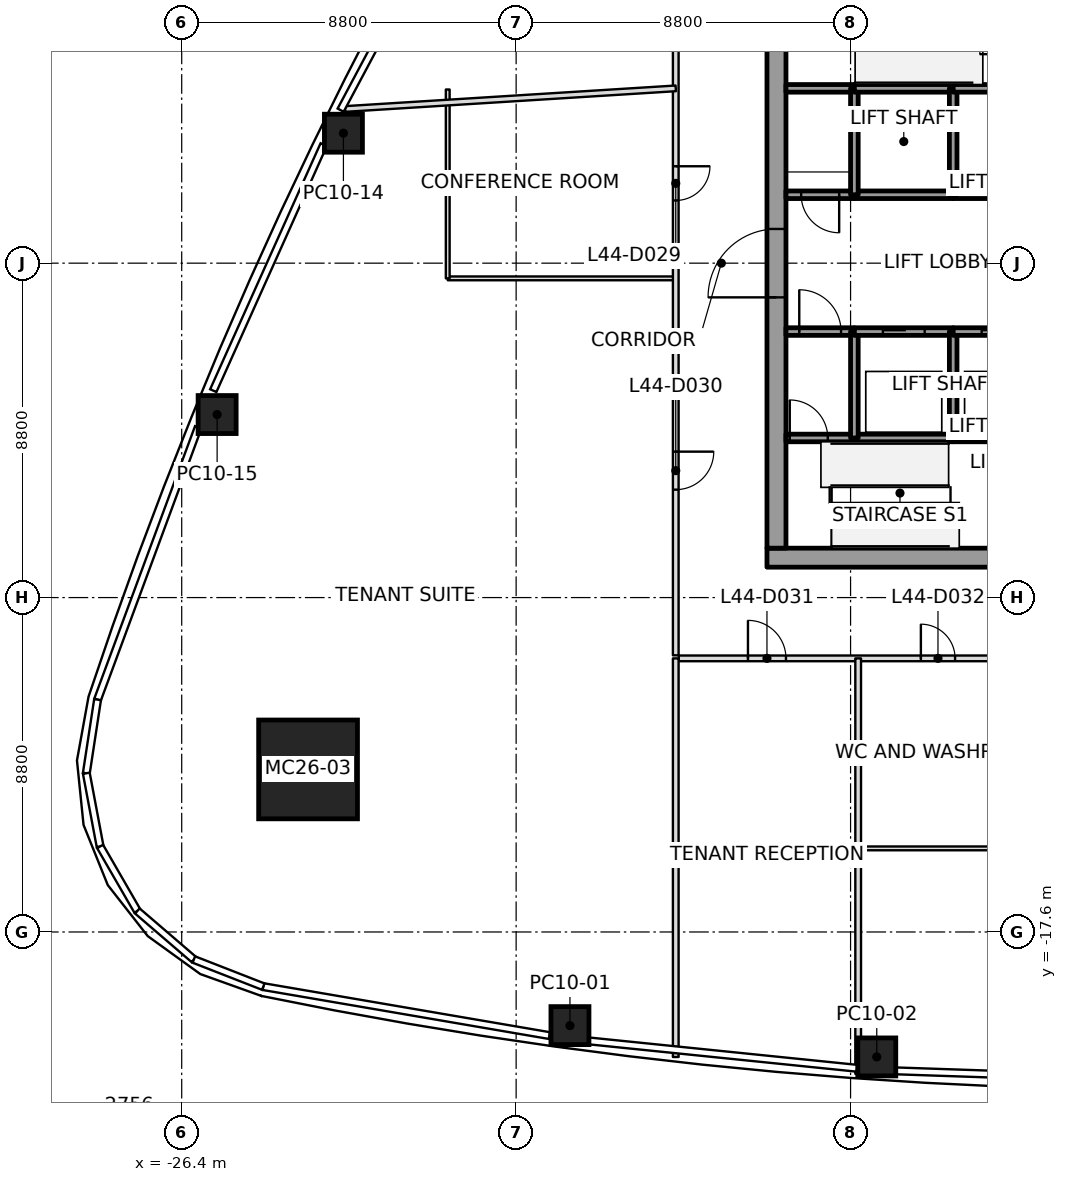
"""IFC4 building model, lengths in metres.
Left out: names, types, materials, properties, quantities, classifications, styles, units other than length and angle.
Written with IfcOpenShell. Run it as: python <this file> out.ifc"""

import sys

from ifc_helpers import new_model, si_unit, direction, frame, frame_2d, origin, origin_2d, place, context, subcontext, project, spatial, rectangle, extrude, element, fill, save


model = new_model("IFC4")
c1 = context("Model", 3, precision=1e-05, world=origin(), true_north=direction((0.0, 1.0)))
c2 = subcontext(c1, "Body", "Model", "MODEL_VIEW")
j1 = project(units=[si_unit("LENGTHUNIT", "METRE"), si_unit("PLANEANGLEUNIT", "RADIAN")], contexts=[c1])
p1 = place(None, origin())
s1 = spatial("IfcSite", under=j1, at=p1, CompositionType="ELEMENT")
p2 = place(p1, origin())
s2 = spatial("IfcBuilding", under=s1, at=p2, CompositionType="ELEMENT")
p3 = place(p2, frame((0.0, 0.0, 197.8)))
s3 = spatial("IfcBuildingStorey", under=s2, at=p3, CompositionType="ELEMENT", Elevation=197.8)
p4 = place(p3, frame((-23.075, -13.322, 0.0), z_axis=(0.028000517465, 0.01610487279, 0.999478165892), x_axis=(0.999607908643, -0.000451121653, -0.027996883176)))
e1 = element("IfcColumn", 1, at=p4, inside=s3, PredefinedType="COLUMN", context=c2, shape_type="SweptSolid", body=[
    extrude(rectangle(XDim=2.6, YDim=2.6, at=origin_2d()), origin(), (0.0, 0.0, 1.0), 4.002),
])
p5 = place(p3, frame((-16.184, -20.064, 0.0), z_axis=(0.017635456472, 0.010434820265, 0.999790030557), x_axis=(-0.99066656356, 0.135357964794, 0.016061793511)))
e2 = element("IfcColumn", 2, at=p5, inside=s3, PredefinedType="COLUMN", context=c2, shape_type="SweptSolid", body=[
    extrude(rectangle(XDim=1.0, YDim=1.0, at=origin_2d()), origin(), (0.0, 0.0, 1.0), 4.001),
])
for number, where, z_axis, x_axis in (
    (3, (-8.111, -20.888, 0.0), (0.009, 0.011, 1.0), (-0.998, 0.068, 0.008)),
    (4, (-22.145, 3.42, 0.0), (0.014, 0.002, 1.0), (0.44, 0.898, -0.008)),
):
    element("IfcColumn", number, at=place(p3, frame(where, z_axis=z_axis, x_axis=x_axis)), inside=s3, PredefinedType="COLUMN", context=c2, shape_type="SweptSolid", body=[
        extrude(rectangle(XDim=1.0, YDim=1.0, at=origin_2d()), origin(), (0.0, 0.0, 1.0), 4.0),
    ])
p6 = place(p3, frame((-25.468, -3.984, 0.0), z_axis=(0.017879535448, 0.010068680372, 0.999789449778), x_axis=(0.378277966466, 0.925552280287, -0.016085911281)))
e5 = element("IfcColumn", 5, at=p6, inside=s3, PredefinedType="COLUMN", context=c2, shape_type="SweptSolid", body=[
    extrude(rectangle(XDim=1.0, YDim=1.0, at=origin_2d()), origin(), (0.0, 0.0, 1.0), 4.001),
])
p7 = place(p3, frame((-11.0, -7.75, 0.0), z_axis=(0.0, 0.0, 1.0), x_axis=(1.0, 0.0, 0.0)))
e6 = element("IfcWall", 6, at=p7, inside=s3, PredefinedType="SHEAR", context=c2, shape_type="SweptSolid", body=[
    extrude(rectangle(XDim=22.0, YDim=0.5, at=frame_2d((11.0, 0.0))), origin(), (0.0, 0.0, 1.0), 4.0),
])
p8 = place(p7, frame((10.45, 0.0, 0.0)))
e7 = element("IfcOpeningElement", 7, at=p8, cuts=e6, PredefinedType="OPENING", context=c2, shape_type="SweptSolid", body=[
    extrude(rectangle(XDim=1.1, YDim=2.1, at=frame_2d((0.55, 1.05))), frame((0.0, 0.25, 0.0), z_axis=(0.0, -1.0, 0.0), x_axis=(1.0, 0.0, 0.0)), (0.0, 0.0, 1.0), 0.5),
])
p9 = place(p3, frame((-10.75, -7.5, 0.0), z_axis=(0.0, 0.0, 1.0), x_axis=(0.0, 1.0, 0.0)))
e8 = element("IfcWall", 8, at=p9, inside=s3, PredefinedType="SHEAR", context=c2, shape_type="SweptSolid", body=[
    extrude(rectangle(XDim=15.0, YDim=0.5, at=frame_2d((7.5, 0.0))), origin(), (0.0, 0.0, 1.0), 4.0),
])
p10 = place(p9, frame((6.6, 0.0, 0.0)))
e9 = element("IfcOpeningElement", 9, at=p10, cuts=e8, PredefinedType="OPENING", context=c2, shape_type="SweptSolid", body=[
    extrude(rectangle(XDim=1.8, YDim=2.1, at=frame_2d((0.9, 1.05))), frame((0.0, 0.25, 0.0), z_axis=(0.0, -1.0, 0.0), x_axis=(1.0, 0.0, 0.0)), (0.0, 0.0, 1.0), 0.5),
])
p11 = place(p3, frame((-10.5, -4.6, 0.0), z_axis=(0.0, 0.0, 1.0), x_axis=(1.0, 0.0, 0.0)))
e10 = element("IfcWall", 10, at=p11, inside=s3, PredefinedType="SOLIDWALL", context=c2, shape_type="SweptSolid", body=[
    extrude(rectangle(XDim=1.8, YDim=0.2, at=frame_2d((0.9, 0.0))), origin(), (0.0, 0.0, 1.0), 3.85),
])
p12 = place(p11, frame((0.1, 0.0, 0.0)))
e11 = element("IfcOpeningElement", 11, at=p12, cuts=e10, PredefinedType="OPENING", context=c2, shape_type="SweptSolid", body=[
    extrude(rectangle(XDim=1.0, YDim=2.1, at=frame_2d((0.5, 1.05))), frame((0.0, 0.1, 0.0), z_axis=(0.0, -1.0, 0.0), x_axis=(1.0, 0.0, 0.0)), (0.0, 0.0, 1.0), 0.2),
])
p13 = place(p3, frame((-10.5, -1.8, 0.0), z_axis=(0.0, 0.0, 1.0), x_axis=(1.0, 0.0, 0.0)))
e12 = element("IfcWall", 12, at=p13, inside=s3, PredefinedType="SOLIDWALL", context=c2, shape_type="SweptSolid", body=[
    extrude(rectangle(XDim=1.8, YDim=0.2, at=frame_2d((0.9, 0.0))), origin(), (0.0, 0.0, 1.0), 3.85),
])
p14 = place(p13, frame((0.35, 0.0, 0.0)))
e13 = element("IfcOpeningElement", 13, at=p14, cuts=e12, PredefinedType="OPENING", context=c2, shape_type="SweptSolid", body=[
    extrude(rectangle(XDim=1.1, YDim=2.1, at=frame_2d((0.55, 1.05))), frame((0.0, 0.1, 0.0), z_axis=(0.0, -1.0, 0.0), x_axis=(1.0, 0.0, 0.0)), (0.0, 0.0, 1.0), 0.2),
])
p15 = place(p3, frame((-8.7, 1.8, 0.0), z_axis=(0.0, 0.0, 1.0), x_axis=(-1.0, 0.0, 0.0)))
e14 = element("IfcWall", 14, at=p15, inside=s3, PredefinedType="SOLIDWALL", context=c2, shape_type="SweptSolid", body=[
    extrude(rectangle(XDim=1.8, YDim=0.2, at=frame_2d((0.9, 0.0))), origin(), (0.0, 0.0, 1.0), 3.85),
])
p16 = place(p15, frame((0.4, 0.0, 0.0)))
e15 = element("IfcOpeningElement", 15, at=p16, cuts=e14, PredefinedType="OPENING", context=c2, shape_type="SweptSolid", body=[
    extrude(rectangle(XDim=1.0, YDim=2.1, at=frame_2d((0.5, 1.05))), frame((0.0, 0.1, 0.0), z_axis=(0.0, -1.0, 0.0), x_axis=(1.0, 0.0, 0.0)), (0.0, 0.0, 1.0), 0.2),
])
p17 = place(p3, frame((-8.7, 4.6, 0.0), z_axis=(0.0, 0.0, 1.0), x_axis=(-1.0, 0.0, 0.0)))
e16 = element("IfcWall", 16, at=p17, inside=s3, PredefinedType="SOLIDWALL", context=c2, shape_type="SweptSolid", body=[
    extrude(rectangle(XDim=1.8, YDim=0.2, at=frame_2d((0.9, 0.0))), origin(), (0.0, 0.0, 1.0), 3.85),
])
p18 = place(p3, frame((-8.7, -4.6, 0.0), z_axis=(0.0, 0.0, 1.0), x_axis=(1.0, 0.0, 0.0)))
e17 = element("IfcWall", 17, at=p18, inside=s3, PredefinedType="SOLIDWALL", context=c2, shape_type="SweptSolid", body=[
    extrude(rectangle(XDim=2.6, YDim=0.2, at=frame_2d((1.3, 0.0))), origin(), (0.0, 0.0, 1.0), 3.85),
])
p19 = place(p3, frame((-8.7, -4.6, 0.0), z_axis=(0.0, 0.0, 1.0), x_axis=(0.0, 1.0, 0.0)))
e18 = element("IfcWall", 18, at=p19, inside=s3, PredefinedType="SOLIDWALL", context=c2, shape_type="SweptSolid", body=[
    extrude(rectangle(XDim=2.8, YDim=0.2, at=frame_2d((1.4, 0.0))), origin(), (0.0, 0.0, 1.0), 3.85),
])
p20 = place(p3, frame((-8.7, -1.8, 0.0), z_axis=(0.0, 0.0, 1.0), x_axis=(1.0, 0.0, 0.0)))
e19 = element("IfcWall", 19, at=p20, inside=s3, PredefinedType="SOLIDWALL", context=c2, shape_type="SweptSolid", body=[
    extrude(rectangle(XDim=2.6, YDim=0.2, at=frame_2d((1.3, 0.0))), origin(), (0.0, 0.0, 1.0), 3.85),
])
p21 = place(p20, frame((0.75, 0.0, 0.0)))
e20 = element("IfcOpeningElement", 20, at=p21, cuts=e19, PredefinedType="OPENING", context=c2, shape_type="SweptSolid", body=[
    extrude(rectangle(XDim=1.1, YDim=2.1, at=frame_2d((0.55, 1.05))), frame((0.0, 0.1, 0.0), z_axis=(0.0, -1.0, 0.0), x_axis=(1.0, 0.0, 0.0)), (0.0, 0.0, 1.0), 0.2),
])
p22 = place(p3, frame((-6.1, 1.8, 0.0), z_axis=(0.0, 0.0, 1.0), x_axis=(-1.0, 0.0, 0.0)))
e21 = element("IfcWall", 21, at=p22, inside=s3, PredefinedType="SOLIDWALL", context=c2, shape_type="SweptSolid", body=[
    extrude(rectangle(XDim=2.6, YDim=0.2, at=frame_2d((1.3, 0.0))), origin(), (0.0, 0.0, 1.0), 3.85),
])
p23 = place(p3, frame((-8.7, 1.8, 0.0), z_axis=(0.0, 0.0, 1.0), x_axis=(0.0, 1.0, 0.0)))
e22 = element("IfcWall", 22, at=p23, inside=s3, PredefinedType="SOLIDWALL", context=c2, shape_type="SweptSolid", body=[
    extrude(rectangle(XDim=2.8, YDim=0.2, at=frame_2d((1.4, 0.0))), origin(), (0.0, 0.0, 1.0), 3.85),
])
p24 = place(p3, frame((-6.1, 4.6, 0.0), z_axis=(0.0, 0.0, 1.0), x_axis=(-1.0, 0.0, 0.0)))
e23 = element("IfcWall", 23, at=p24, inside=s3, PredefinedType="SOLIDWALL", context=c2, shape_type="SweptSolid", body=[
    extrude(rectangle(XDim=2.6, YDim=0.2, at=frame_2d((1.3, 0.0))), origin(), (0.0, 0.0, 1.0), 3.85),
])
p25 = place(p3, frame((-6.1, -4.6, 0.0), z_axis=(0.0, 0.0, 1.0), x_axis=(1.0, 0.0, 0.0)))
e24 = element("IfcWall", 24, at=p25, inside=s3, PredefinedType="SOLIDWALL", context=c2, shape_type="SweptSolid", body=[
    extrude(rectangle(XDim=1.6, YDim=0.2, at=frame_2d((0.8, 0.0))), origin(), (0.0, 0.0, 1.0), 3.85),
])
p26 = place(p3, frame((-6.1, -4.6, 0.0), z_axis=(0.0, 0.0, 1.0), x_axis=(0.0, 1.0, 0.0)))
e25 = element("IfcWall", 25, at=p26, inside=s3, PredefinedType="SOLIDWALL", context=c2, shape_type="SweptSolid", body=[
    extrude(rectangle(XDim=2.8, YDim=0.2, at=frame_2d((1.4, 0.0))), origin(), (0.0, 0.0, 1.0), 3.85),
])
p27 = place(p3, frame((-6.1, -1.8, 0.0), z_axis=(0.0, 0.0, 1.0), x_axis=(1.0, 0.0, 0.0)))
e26 = element("IfcWall", 26, at=p27, inside=s3, PredefinedType="SOLIDWALL", context=c2, shape_type="SweptSolid", body=[
    extrude(rectangle(XDim=2.6, YDim=0.2, at=frame_2d((1.3, 0.0))), origin(), (0.0, 0.0, 1.0), 3.85),
])
p28 = place(p27, frame((0.75, 0.0, 0.0)))
e27 = element("IfcOpeningElement", 27, at=p28, cuts=e26, PredefinedType="OPENING", context=c2, shape_type="SweptSolid", body=[
    extrude(rectangle(XDim=1.1, YDim=2.1, at=frame_2d((0.55, 1.05))), frame((0.0, 0.1, 0.0), z_axis=(0.0, -1.0, 0.0), x_axis=(1.0, 0.0, 0.0)), (0.0, 0.0, 1.0), 0.2),
])
p29 = place(p3, frame((-3.5, 1.8, 0.0), z_axis=(0.0, 0.0, 1.0), x_axis=(-1.0, 0.0, 0.0)))
e28 = element("IfcWall", 28, at=p29, inside=s3, PredefinedType="SOLIDWALL", context=c2, shape_type="SweptSolid", body=[
    extrude(rectangle(XDim=2.6, YDim=0.2, at=frame_2d((1.3, 0.0))), origin(), (0.0, 0.0, 1.0), 3.85),
])
p30 = place(p3, frame((-6.1, 1.8, 0.0), z_axis=(0.0, 0.0, 1.0), x_axis=(0.0, 1.0, 0.0)))
e29 = element("IfcWall", 29, at=p30, inside=s3, PredefinedType="SOLIDWALL", context=c2, shape_type="SweptSolid", body=[
    extrude(rectangle(XDim=2.8, YDim=0.2, at=frame_2d((1.4, 0.0))), origin(), (0.0, 0.0, 1.0), 3.85),
])
p31 = place(p3, frame((-4.3, 4.6, 0.0), z_axis=(0.0, 0.0, 1.0), x_axis=(-1.0, 0.0, 0.0)))
e30 = element("IfcWall", 30, at=p31, inside=s3, PredefinedType="SOLIDWALL", context=c2, shape_type="SweptSolid", body=[
    extrude(rectangle(XDim=1.8, YDim=0.2, at=frame_2d((0.9, 0.0))), origin(), (0.0, 0.0, 1.0), 3.85),
])
p32 = place(p3, frame((-13.4, 4.6, 0.0), z_axis=(0.0, 0.0, 1.0), x_axis=(-0.998057152045, -0.062305066026, 0.0)))
e31 = element("IfcWall", 31, at=p32, inside=s3, PredefinedType="PARTITIONING", context=c2, shape_type="SweptSolid", body=[
    extrude(rectangle(XDim=8.719, YDim=0.15, at=frame_2d((4.359, 0.0))), origin(), (0.0, 0.0, 1.0), 3.234),
])
p33 = place(p3, frame((-13.4, -10.4, 0.0), z_axis=(0.0, 0.0, 1.0), x_axis=(0.0, -1.0, 0.0)))
e32 = element("IfcWall", 32, at=p33, inside=s3, PredefinedType="PARTITIONING", context=c2, shape_type="SweptSolid", body=[
    extrude(rectangle(XDim=10.49, YDim=0.15, at=frame_2d((5.245, 0.0))), origin(), (0.0, 0.0, 1.0), 3.234),
])
p34 = place(p3, frame((-8.6, -10.4, 0.0), z_axis=(0.0, 0.0, 1.0), x_axis=(0.0, -1.0, 0.0)))
e33 = element("IfcWall", 33, at=p34, inside=s3, PredefinedType="PARTITIONING", context=c2, shape_type="SweptSolid", body=[
    extrude(rectangle(XDim=10.934, YDim=0.15, at=frame_2d((5.467, 0.0))), origin(), (0.0, 0.0, 1.0), 3.234),
])
p35 = place(p3, frame((-13.4, 10.32, 0.0), z_axis=(0.0, 0.0, 1.0), x_axis=(0.0, -1.0, 0.0)))
e34 = element("IfcWall", 34, at=p35, inside=s3, PredefinedType="PARTITIONING", context=c2, shape_type="SweptSolid", body=[
    extrude(rectangle(XDim=20.64, YDim=0.15, at=frame_2d((10.32, 0.0))), origin(), (0.0, 0.0, 1.0), 3.166),
])
p36 = place(p35, frame((2.32, 0.0, 0.0)))
e35 = element("IfcOpeningElement", 35, at=p36, cuts=e34, PredefinedType="OPENING", context=c2, shape_type="SweptSolid", body=[
    extrude(rectangle(XDim=1.0, YDim=2.1, at=frame_2d((0.5, 1.05))), frame((0.0, 0.075, 0.0), z_axis=(0.0, -1.0, 0.0), x_axis=(1.0, 0.0, 0.0)), (0.0, 0.0, 1.0), 0.15),
])
p37 = place(p35, frame((7.77, 0.0, 0.0)))
e36 = element("IfcOpeningElement", 36, at=p37, cuts=e34, PredefinedType="OPENING", context=c2, shape_type="SweptSolid", body=[
    extrude(rectangle(XDim=0.9, YDim=2.1, at=frame_2d((0.45, 1.05))), frame((0.0, 0.075, 0.0), z_axis=(0.0, -1.0, 0.0), x_axis=(1.0, 0.0, 0.0)), (0.0, 0.0, 1.0), 0.15),
])
p38 = place(p35, frame((15.28, 0.0, 0.0)))
e37 = element("IfcOpeningElement", 37, at=p38, cuts=e34, PredefinedType="OPENING", context=c2, shape_type="SweptSolid", body=[
    extrude(rectangle(XDim=1.0, YDim=2.1, at=frame_2d((0.5, 1.05))), frame((0.0, 0.075, 0.0), z_axis=(0.0, -1.0, 0.0), x_axis=(1.0, 0.0, 0.0)), (0.0, 0.0, 1.0), 0.15),
])
p39 = place(p3, frame((-13.32, -10.4, 0.0), z_axis=(0.0, 0.0, 1.0), x_axis=(1.0, 0.0, 0.0)))
e38 = element("IfcWall", 38, at=p39, inside=s3, PredefinedType="PARTITIONING", context=c2, shape_type="SweptSolid", body=[
    extrude(rectangle(XDim=26.64, YDim=0.15, at=frame_2d((13.32, 0.0))), origin(), (0.0, 0.0, 1.0), 3.317),
])
p40 = place(p39, frame((1.82, 0.0, 0.0)))
e39 = element("IfcOpeningElement", 39, at=p40, cuts=e38, PredefinedType="OPENING", context=c2, shape_type="SweptSolid", body=[
    extrude(rectangle(XDim=1.0, YDim=2.1, at=frame_2d((0.5, 1.05))), frame((0.0, 0.075, 0.0), z_axis=(0.0, -1.0, 0.0), x_axis=(1.0, 0.0, 0.0)), (0.0, 0.0, 1.0), 0.15),
])
p41 = place(p39, frame((6.37, 0.0, 0.0)))
e40 = element("IfcOpeningElement", 40, at=p41, cuts=e38, PredefinedType="OPENING", context=c2, shape_type="SweptSolid", body=[
    extrude(rectangle(XDim=0.9, YDim=2.1, at=frame_2d((0.45, 1.05))), frame((0.0, 0.075, 0.0), z_axis=(0.0, -1.0, 0.0), x_axis=(1.0, 0.0, 0.0)), (0.0, 0.0, 1.0), 0.15),
])
p42 = place(p39, frame((12.62, 0.0, 0.0)))
e41 = element("IfcOpeningElement", 41, at=p42, cuts=e38, PredefinedType="OPENING", context=c2, shape_type="SweptSolid", body=[
    extrude(rectangle(XDim=1.0, YDim=2.1, at=frame_2d((0.5, 1.05))), frame((0.0, 0.075, 0.0), z_axis=(0.0, -1.0, 0.0), x_axis=(1.0, 0.0, 0.0)), (0.0, 0.0, 1.0), 0.15),
])
p43 = place(p39, frame((21.47, 0.0, 0.0)))
e42 = element("IfcOpeningElement", 42, at=p43, cuts=e38, PredefinedType="OPENING", context=c2, shape_type="SweptSolid", body=[
    extrude(rectangle(XDim=1.0, YDim=2.1, at=frame_2d((0.5, 1.05))), frame((0.0, 0.075, 0.0), z_axis=(0.0, -1.0, 0.0), x_axis=(1.0, 0.0, 0.0)), (0.0, 0.0, 1.0), 0.15),
])
p44 = place(p3, frame((-13.43, -0.4, 0.0), z_axis=(0.0, 0.0, 1.0), x_axis=(-1.0, 0.0, 0.0)))
e43 = element("IfcWall", 43, at=p44, inside=s3, PredefinedType="PARTITIONING", context=c2, shape_type="SweptSolid", body=[
    extrude(rectangle(XDim=5.97, YDim=0.1, at=frame_2d((2.985, 0.0))), origin(), (0.0, 0.0, 1.0), 3.45),
])
p45 = place(p3, frame((-19.4, -0.4, 0.0), z_axis=(0.0, 0.0, 1.0), x_axis=(0.0, 1.0, 0.0)))
e44 = element("IfcWall", 44, at=p45, inside=s3, PredefinedType="PARTITIONING", context=c2, shape_type="SweptSolid", body=[
    extrude(rectangle(XDim=4.97, YDim=0.1, at=frame_2d((2.485, 0.0))), origin(), (0.0, 0.0, 1.0), 3.45),
])
p46 = place(p3, frame((-4.4, -15.4, 0.0), z_axis=(0.0, 0.0, 1.0), x_axis=(-1.0, 0.0, 0.0)))
e45 = element("IfcWall", 45, at=p46, inside=s3, PredefinedType="PARTITIONING", context=c2, shape_type="SweptSolid", body=[
    extrude(rectangle(XDim=4.17, YDim=0.1, at=frame_2d((2.085, 0.0))), origin(), (0.0, 0.0, 1.0), 3.317),
])
p47 = place(p37, origin())
e46 = element("IfcDoor", 46, at=p47, inside=s3, OperationType="SINGLE_SWING_RIGHT", PredefinedType="DOOR", context=c2, shape_type="SweptSolid", body=[
    extrude(rectangle(XDim=0.9, YDim=2.1, at=frame_2d((0.45, 1.05))), frame((0.0, 0.025, 0.0), z_axis=(0.0, -1.0, 0.0), x_axis=(1.0, 0.0, 0.0)), (0.0, 0.0, 1.0), 0.05),
])
fill(e36, e46)
p48 = place(p38, origin())
e47 = element("IfcDoor", 47, at=p48, inside=s3, OperationType="SINGLE_SWING_LEFT", PredefinedType="DOOR", context=c2, shape_type="SweptSolid", body=[
    extrude(rectangle(XDim=1.0, YDim=2.1, at=frame_2d((0.5, 1.05))), frame((0.0, 0.025, 0.0), z_axis=(0.0, -1.0, 0.0), x_axis=(1.0, 0.0, 0.0)), (0.0, 0.0, 1.0), 0.05),
])
fill(e37, e47)
p49 = place(p40, origin())
e48 = element("IfcDoor", 48, at=p49, inside=s3, OperationType="SINGLE_SWING_RIGHT", PredefinedType="DOOR", context=c2, shape_type="SweptSolid", body=[
    extrude(rectangle(XDim=1.0, YDim=2.1, at=frame_2d((0.5, 1.05))), frame((0.0, 0.025, 0.0), z_axis=(0.0, -1.0, 0.0), x_axis=(1.0, 0.0, 0.0)), (0.0, 0.0, 1.0), 0.05),
])
fill(e39, e48)
p50 = place(p41, origin())
e49 = element("IfcDoor", 49, at=p50, inside=s3, OperationType="SINGLE_SWING_RIGHT", PredefinedType="DOOR", context=c2, shape_type="SweptSolid", body=[
    extrude(rectangle(XDim=0.9, YDim=2.1, at=frame_2d((0.45, 1.05))), frame((0.0, 0.025, 0.0), z_axis=(0.0, -1.0, 0.0), x_axis=(1.0, 0.0, 0.0)), (0.0, 0.0, 1.0), 0.05),
])
fill(e40, e49)
p51 = place(p21, origin())
e50 = element("IfcDoor", 50, at=p51, inside=s3, OperationType="SLIDING_TO_RIGHT", PredefinedType="DOOR", context=c2, shape_type="SweptSolid", body=[
    extrude(rectangle(XDim=1.1, YDim=2.1, at=frame_2d((0.55, 1.05))), frame((0.0, 0.025, 0.0), z_axis=(0.0, -1.0, 0.0), x_axis=(1.0, 0.0, 0.0)), (0.0, 0.0, 1.0), 0.05),
])
fill(e20, e50)
p52 = place(p28, origin())
e51 = element("IfcDoor", 51, at=p52, inside=s3, OperationType="SLIDING_TO_LEFT", PredefinedType="DOOR", context=c2, shape_type="SweptSolid", body=[
    extrude(rectangle(XDim=1.1, YDim=2.1, at=frame_2d((0.55, 1.05))), frame((0.0, 0.025, 0.0), z_axis=(0.0, -1.0, 0.0), x_axis=(1.0, 0.0, 0.0)), (0.0, 0.0, 1.0), 0.05),
])
fill(e27, e51)
p53 = place(p14, origin())
e52 = element("IfcDoor", 52, at=p53, inside=s3, OperationType="SINGLE_SWING_RIGHT", PredefinedType="DOOR", context=c2, shape_type="SweptSolid", body=[
    extrude(rectangle(XDim=1.1, YDim=2.1, at=frame_2d((0.55, 1.05))), frame((0.0, 0.025, 0.0), z_axis=(0.0, -1.0, 0.0), x_axis=(1.0, 0.0, 0.0)), (0.0, 0.0, 1.0), 0.05),
])
fill(e13, e52)
p54 = place(p16, origin())
e53 = element("IfcDoor", 53, at=p54, inside=s3, OperationType="SINGLE_SWING_LEFT", PredefinedType="DOOR", context=c2, shape_type="SweptSolid", body=[
    extrude(rectangle(XDim=1.0, YDim=2.1, at=frame_2d((0.5, 1.05))), frame((0.0, 0.025, 0.0), z_axis=(0.0, -1.0, 0.0), x_axis=(1.0, 0.0, 0.0)), (0.0, 0.0, 1.0), 0.05),
])
fill(e15, e53)
p55 = place(p12, origin())
e54 = element("IfcDoor", 54, at=p55, inside=s3, OperationType="SINGLE_SWING_LEFT", PredefinedType="DOOR", context=c2, shape_type="SweptSolid", body=[
    extrude(rectangle(XDim=1.0, YDim=2.1, at=frame_2d((0.5, 1.05))), frame((0.0, 0.025, 0.0), z_axis=(0.0, -1.0, 0.0), x_axis=(1.0, 0.0, 0.0)), (0.0, 0.0, 1.0), 0.05),
])
fill(e11, e54)
p56 = place(p10, origin())
e55 = element("IfcDoor", 55, at=p56, inside=s3, OperationType="DOUBLE_DOOR_SINGLE_SWING", PredefinedType="DOOR", context=c2, shape_type="SweptSolid", body=[
    extrude(rectangle(XDim=1.8, YDim=2.1, at=frame_2d((0.9, 1.05))), frame((0.0, 0.025, 0.0), z_axis=(0.0, -1.0, 0.0), x_axis=(1.0, 0.0, 0.0)), (0.0, 0.0, 1.0), 0.05),
])
fill(e9, e55)
save(model, sys.argv[1])
